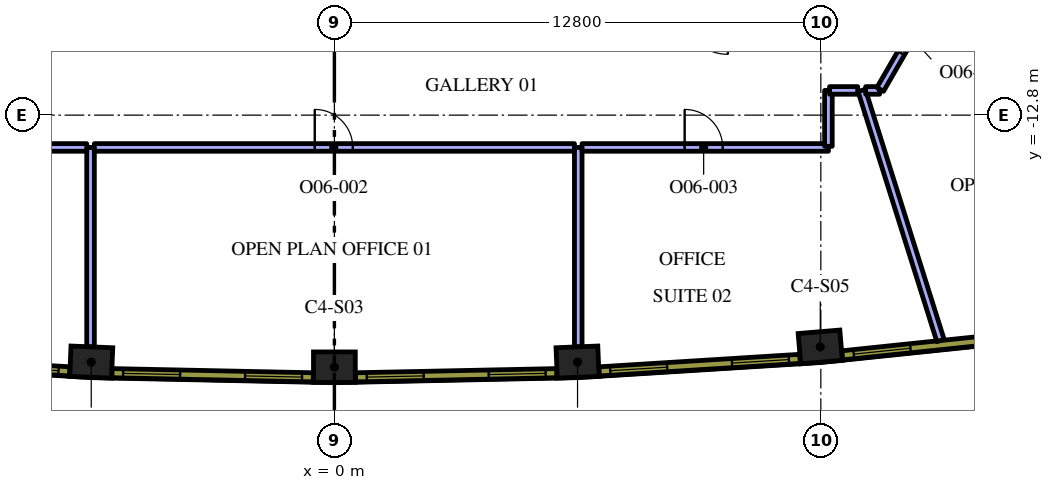
"""IFC4 building model, lengths in metres.
Left out: names, types, materials, properties, quantities, classifications, styles, units other than length and angle.
Written with IfcOpenShell. Run it as: python <this file> out.ifc"""

import sys

from ifc_helpers import new_model, si_unit, direction, frame, frame_2d, origin, origin_2d, place, context, subcontext, project, spatial, rectangle, extrude, element, fill, save


model = new_model("IFC4")
c1 = context("Model", 3, precision=1e-05, world=origin(), true_north=direction((0.0, 1.0)))
c2 = subcontext(c1, "Body", "Model", "MODEL_VIEW")
j1 = project(units=[si_unit("LENGTHUNIT", "METRE"), si_unit("PLANEANGLEUNIT", "RADIAN")], contexts=[c1])
p1 = place(None, origin())
s1 = spatial("IfcSite", under=j1, at=p1, CompositionType="ELEMENT")
p2 = place(p1, origin())
s2 = spatial("IfcBuilding", under=s1, at=p2, CompositionType="ELEMENT")
p3 = place(p2, frame((0.0, 0.0, 205.8)))
s3 = spatial("IfcBuildingStorey", under=s2, at=p3, CompositionType="ELEMENT", Elevation=205.8)
for number, where, z_axis, x_axis in (
    (1, (-6.398, -19.298, 0.0), (0.0, 0.0, 1.0), (0.999, -0.041, 0.0)),
    (2, (0.0, -19.431, 0.0), (0.0, 0.0, 1.0), (1.0, 0.0, 0.0)),
    (3, (6.398, -19.298, 0.0), (0.0, 0.0, 1.0), (0.999, 0.041, 0.0)),
    (4, (12.785, -18.9, 0.0), (0.0, 0.0, 1.0), (0.997, 0.083, 0.0)),
):
    element("IfcColumn", number, at=place(p3, frame(where, z_axis=z_axis, x_axis=x_axis)), inside=s3, PredefinedType="COLUMN", context=c2, shape_type="SweptSolid", body=[
        extrude(rectangle(XDim=1.1, YDim=0.8, at=origin_2d()), origin(), (0.0, 0.0, 1.0), 4.2),
    ])
p4 = place(p3, frame((-6.417, -13.65, 0.0), z_axis=(0.0, 0.0, 1.0), x_axis=(0.0, -1.0, 0.0)))
e5 = element("IfcWall", 5, at=p4, inside=s3, PredefinedType="PARTITIONING", context=c2, shape_type="SweptSolid", body=[
    extrude(rectangle(XDim=5.247, YDim=0.2, at=frame_2d((2.624, 0.0))), origin(), (0.0, 0.0, 1.0), 3.45),
])
p5 = place(p3, frame((-12.97, -13.65, 0.0), z_axis=(0.0, 0.0, 1.0), x_axis=(1.0, 0.0, 0.0)))
e6 = element("IfcWall", 6, at=p5, inside=s3, PredefinedType="PARTITIONING", context=c2, shape_type="SweptSolid", body=[
    extrude(rectangle(XDim=6.453, YDim=0.2, at=frame_2d((3.227, 0.0))), origin(), (0.0, 0.0, 1.0), 3.45),
])
p6 = place(p5, frame((2.7, 0.0, 0.0)))
e7 = element("IfcOpeningElement", 7, at=p6, cuts=e6, PredefinedType="OPENING", context=c2, shape_type="SweptSolid", body=[
    extrude(rectangle(XDim=1.0, YDim=2.1, at=frame_2d((0.5, 1.05))), frame((0.0, 0.11, 0.0), z_axis=(0.0, -1.0, 0.0), x_axis=(1.0, 0.0, 0.0)), (0.0, 0.0, 1.0), 0.22),
])
p7 = place(p3, frame((6.417, -13.65, 0.0), z_axis=(0.0, 0.0, 1.0), x_axis=(0.0, -1.0, 0.0)))
e8 = element("IfcWall", 8, at=p7, inside=s3, PredefinedType="PARTITIONING", context=c2, shape_type="SweptSolid", body=[
    extrude(rectangle(XDim=5.247, YDim=0.2, at=frame_2d((2.624, 0.0))), origin(), (0.0, 0.0, 1.0), 3.45),
])
p8 = place(p3, frame((-6.317, -13.65, 0.0), z_axis=(0.0, 0.0, 1.0), x_axis=(1.0, 0.0, 0.0)))
e9 = element("IfcWall", 9, at=p8, inside=s3, PredefinedType="PARTITIONING", context=c2, shape_type="SweptSolid", body=[
    extrude(rectangle(XDim=12.634, YDim=0.2, at=frame_2d((6.317, 0.0))), origin(), (0.0, 0.0, 1.0), 3.45),
])
p9 = place(p8, frame((5.8, 0.0, 0.0)))
e10 = element("IfcOpeningElement", 10, at=p9, cuts=e9, PredefinedType="OPENING", context=c2, shape_type="SweptSolid", body=[
    extrude(rectangle(XDim=1.0, YDim=2.1, at=frame_2d((0.5, 1.05))), frame((0.0, 0.11, 0.0), z_axis=(0.0, -1.0, 0.0), x_axis=(1.0, 0.0, 0.0)), (0.0, 0.0, 1.0), 0.22),
])
p10 = place(p3, frame((13.875, -12.15, 0.0), z_axis=(0.0, 0.0, 1.0), x_axis=(0.3005606746, -0.953762696316, 0.0)))
e11 = element("IfcWall", 11, at=p10, inside=s3, PredefinedType="PARTITIONING", context=c2, shape_type="SweptSolid", body=[
    extrude(rectangle(XDim=6.9, YDim=0.2, at=frame_2d((3.45, 0.0))), origin(), (0.0, 0.0, 1.0), 3.45),
])
p11 = place(p3, frame((6.517, -13.65, 0.0), z_axis=(0.0, 0.0, 1.0), x_axis=(1.0, 0.0, 0.0)))
e12 = element("IfcWall", 12, at=p11, inside=s3, PredefinedType="PARTITIONING", context=c2, shape_type="SweptSolid", body=[
    extrude(rectangle(XDim=6.483, YDim=0.2, at=frame_2d((3.242, 0.0))), origin(), (0.0, 0.0, 1.0), 3.45),
])
p12 = place(p11, frame((2.7, 0.0, 0.0)))
e13 = element("IfcOpeningElement", 13, at=p12, cuts=e12, PredefinedType="OPENING", context=c2, shape_type="SweptSolid", body=[
    extrude(rectangle(XDim=1.0, YDim=2.1, at=frame_2d((0.5, 1.05))), frame((0.0, 0.11, 0.0), z_axis=(0.0, -1.0, 0.0), x_axis=(1.0, 0.0, 0.0)), (0.0, 0.0, 1.0), 0.22),
])
p13 = place(p3, frame((13.0, -13.62, 0.0), z_axis=(0.0, 0.0, 1.0), x_axis=(0.0, 1.0, 0.0)))
e14 = element("IfcWall", 14, at=p13, inside=s3, PredefinedType="PARTITIONING", context=c2, shape_type="SweptSolid", body=[
    extrude(rectangle(XDim=1.47, YDim=0.2, at=frame_2d((0.735, 0.0))), origin(), (0.0, 0.0, 1.0), 3.45),
])
p14 = place(p3, frame((13.03, -12.15, 0.0), z_axis=(0.0, 0.0, 1.0), x_axis=(1.0, 0.0, 0.0)))
e15 = element("IfcWall", 15, at=p14, inside=s3, PredefinedType="PARTITIONING", context=c2, shape_type="SweptSolid", body=[
    extrude(rectangle(XDim=0.74, YDim=0.2, at=frame_2d((0.37, 0.0))), origin(), (0.0, 0.0, 1.0), 3.45),
])
p15 = place(p3, frame((16.021, -9.25, 0.0), z_axis=(0.0, 0.0, 1.0), x_axis=(0.86602692059, -0.499997372806, 0.0)))
e16 = element("IfcWall", 16, at=p15, inside=s3, PredefinedType="PARTITIONING", context=c2, shape_type="SweptSolid", body=[
    extrude(rectangle(XDim=6.765, YDim=0.2, at=frame_2d((3.382, 0.0))), origin(), (0.0, 0.0, 1.0), 3.45),
])
p16 = place(p3, frame((13.98, -12.15, 0.0), z_axis=(0.0, 0.0, 1.0), x_axis=(1.0, 0.0, 0.0)))
e17 = element("IfcWall", 17, at=p16, inside=s3, PredefinedType="PARTITIONING", context=c2, shape_type="SweptSolid", body=[
    extrude(rectangle(XDim=0.367, YDim=0.2, at=frame_2d((0.184, 0.0))), origin(), (0.0, 0.0, 1.0), 3.45),
])
p17 = place(p3, frame((14.362, -12.124, 0.0), z_axis=(0.0, 0.0, 1.0), x_axis=(0.500022299258, 0.866012528919, 0.0)))
e18 = element("IfcWall", 18, at=p17, inside=s3, PredefinedType="PARTITIONING", context=c2, shape_type="SweptSolid", body=[
    extrude(rectangle(XDim=3.219, YDim=0.2, at=frame_2d((1.609, 0.0))), origin(), (0.0, 0.0, 1.0), 3.45),
])
p18 = place(p17, frame((1.1, 0.0, 0.0)))
e19 = element("IfcOpeningElement", 19, at=p18, cuts=e18, PredefinedType="OPENING", context=c2, shape_type="SweptSolid", body=[
    extrude(rectangle(XDim=1.0, YDim=2.1, at=frame_2d((0.5, 1.05))), frame((0.0, 0.11, 0.0), z_axis=(0.0, -1.0, 0.0), x_axis=(1.0, 0.0, 0.0)), (0.0, 0.0, 1.0), 0.22),
])
p19 = place(p3, frame((-12.253, -19.213, 0.0), z_axis=(0.0, 0.0, 1.0), x_axis=(0.9980633213, -0.062206162685, 0.0)))
e20 = element("IfcWall", 20, at=p19, inside=s3, PredefinedType="SOLIDWALL", context=c2, shape_type="SweptSolid", body=[
    extrude(rectangle(XDim=5.298, YDim=0.24, at=frame_2d((2.649, 0.0))), origin(), (0.0, 0.0, 1.0), 3.95),
])
p20 = place(p19, frame((0.294, 0.0, 0.9)))
e21 = element("IfcOpeningElement", 21, at=p20, cuts=e20, PredefinedType="OPENING", context=c2, shape_type="SweptSolid", body=[
    extrude(rectangle(XDim=1.5, YDim=2.55, at=frame_2d((0.75, 1.275))), frame((0.0, 0.13, 0.0), z_axis=(0.0, -1.0, 0.0), x_axis=(1.0, 0.0, 0.0)), (0.0, 0.0, 1.0), 0.26),
])
p21 = place(p19, frame((3.504, 0.0, 0.9)))
e22 = element("IfcOpeningElement", 22, at=p21, cuts=e20, PredefinedType="OPENING", context=c2, shape_type="SweptSolid", body=[
    extrude(rectangle(XDim=1.5, YDim=2.55, at=frame_2d((0.75, 1.275))), frame((0.0, 0.13, 0.0), z_axis=(0.0, -1.0, 0.0), x_axis=(1.0, 0.0, 0.0)), (0.0, 0.0, 1.0), 0.26),
])
p22 = place(p3, frame((-5.854, -19.589, 0.0), z_axis=(0.0, 0.0, 1.0), x_axis=(0.999784035184, -0.020781794712, 0.0)))
e23 = element("IfcWall", 23, at=p22, inside=s3, PredefinedType="SOLIDWALL", context=c2, shape_type="SweptSolid", body=[
    extrude(rectangle(XDim=5.298, YDim=0.24, at=frame_2d((2.649, 0.0))), origin(), (0.0, 0.0, 1.0), 3.95),
])
p23 = place(p22, frame((0.294, 0.0, 0.9)))
e24 = element("IfcOpeningElement", 24, at=p23, cuts=e23, PredefinedType="OPENING", context=c2, shape_type="SweptSolid", body=[
    extrude(rectangle(XDim=1.5, YDim=2.55, at=frame_2d((0.75, 1.275))), frame((0.0, 0.13, 0.0), z_axis=(0.0, -1.0, 0.0), x_axis=(1.0, 0.0, 0.0)), (0.0, 0.0, 1.0), 0.26),
])
p24 = place(p22, frame((3.504, 0.0, 0.9)))
e25 = element("IfcOpeningElement", 25, at=p24, cuts=e23, PredefinedType="OPENING", context=c2, shape_type="SweptSolid", body=[
    extrude(rectangle(XDim=1.5, YDim=2.55, at=frame_2d((0.75, 1.275))), frame((0.0, 0.13, 0.0), z_axis=(0.0, -1.0, 0.0), x_axis=(1.0, 0.0, 0.0)), (0.0, 0.0, 1.0), 0.26),
])
p25 = place(p3, frame((0.556, -19.699, 0.0), z_axis=(0.0, 0.0, 1.0), x_axis=(0.999784035184, 0.020781794712, 0.0)))
e26 = element("IfcWall", 26, at=p25, inside=s3, PredefinedType="SOLIDWALL", context=c2, shape_type="SweptSolid", body=[
    extrude(rectangle(XDim=5.298, YDim=0.24, at=frame_2d((2.649, 0.0))), origin(), (0.0, 0.0, 1.0), 3.95),
])
p26 = place(p25, frame((0.294, 0.0, 0.9)))
e27 = element("IfcOpeningElement", 27, at=p26, cuts=e26, PredefinedType="OPENING", context=c2, shape_type="SweptSolid", body=[
    extrude(rectangle(XDim=1.5, YDim=2.55, at=frame_2d((0.75, 1.275))), frame((0.0, 0.13, 0.0), z_axis=(0.0, -1.0, 0.0), x_axis=(1.0, 0.0, 0.0)), (0.0, 0.0, 1.0), 0.26),
])
p27 = place(p25, frame((3.504, 0.0, 0.9)))
e28 = element("IfcOpeningElement", 28, at=p27, cuts=e26, PredefinedType="OPENING", context=c2, shape_type="SweptSolid", body=[
    extrude(rectangle(XDim=1.5, YDim=2.55, at=frame_2d((0.75, 1.275))), frame((0.0, 0.13, 0.0), z_axis=(0.0, -1.0, 0.0), x_axis=(1.0, 0.0, 0.0)), (0.0, 0.0, 1.0), 0.26),
])
p28 = place(p3, frame((6.965, -19.543, 0.0), z_axis=(0.0, 0.0, 1.0), x_axis=(0.9980633213, 0.062206162685, 0.0)))
e29 = element("IfcWall", 29, at=p28, inside=s3, PredefinedType="SOLIDWALL", context=c2, shape_type="SweptSolid", body=[
    extrude(rectangle(XDim=5.298, YDim=0.24, at=frame_2d((2.649, 0.0))), origin(), (0.0, 0.0, 1.0), 3.95),
])
p29 = place(p28, frame((0.295, 0.0, 0.9)))
e30 = element("IfcOpeningElement", 30, at=p29, cuts=e29, PredefinedType="OPENING", context=c2, shape_type="SweptSolid", body=[
    extrude(rectangle(XDim=1.5, YDim=2.55, at=frame_2d((0.75, 1.275))), frame((0.0, 0.13, 0.0), z_axis=(0.0, -1.0, 0.0), x_axis=(1.0, 0.0, 0.0)), (0.0, 0.0, 1.0), 0.26),
])
p30 = place(p28, frame((3.504, 0.0, 0.9)))
e31 = element("IfcOpeningElement", 31, at=p30, cuts=e29, PredefinedType="OPENING", context=c2, shape_type="SweptSolid", body=[
    extrude(rectangle(XDim=1.5, YDim=2.55, at=frame_2d((0.75, 1.275))), frame((0.0, 0.13, 0.0), z_axis=(0.0, -1.0, 0.0), x_axis=(1.0, 0.0, 0.0)), (0.0, 0.0, 1.0), 0.26),
])
p31 = place(p3, frame((13.362, -19.121, 0.0), z_axis=(0.0, 0.0, 1.0), x_axis=(0.994621961215, 0.103571976272, 0.0)))
e32 = element("IfcWall", 32, at=p31, inside=s3, PredefinedType="SOLIDWALL", context=c2, shape_type="SweptSolid", body=[
    extrude(rectangle(XDim=5.311, YDim=0.24, at=frame_2d((2.655, 0.0))), origin(), (0.0, 0.0, 1.0), 3.95),
])
p32 = place(p31, frame((0.306, 0.0, 0.9)))
e33 = element("IfcOpeningElement", 33, at=p32, cuts=e32, PredefinedType="OPENING", context=c2, shape_type="SweptSolid", body=[
    extrude(rectangle(XDim=1.5, YDim=2.55, at=frame_2d((0.75, 1.275))), frame((0.0, 0.13, 0.0), z_axis=(0.0, -1.0, 0.0), x_axis=(1.0, 0.0, 0.0)), (0.0, 0.0, 1.0), 0.26),
])
p33 = place(p31, frame((3.539, 0.0, 0.9)))
e34 = element("IfcOpeningElement", 34, at=p33, cuts=e32, PredefinedType="OPENING", context=c2, shape_type="SweptSolid", body=[
    extrude(rectangle(XDim=1.5, YDim=2.55, at=frame_2d((0.75, 1.275))), frame((0.0, 0.13, 0.0), z_axis=(0.0, -1.0, 0.0), x_axis=(1.0, 0.0, 0.0)), (0.0, 0.0, 1.0), 0.26),
])
p34 = place(p9, origin())
e35 = element("IfcDoor", 35, at=p34, inside=s3, OperationType="SINGLE_SWING_LEFT", PredefinedType="DOOR", context=c2, shape_type="SweptSolid", body=[
    extrude(rectangle(XDim=1.0, YDim=2.1, at=frame_2d((0.5, 1.05))), frame((0.0, 0.025, 0.0), z_axis=(0.0, -1.0, 0.0), x_axis=(1.0, 0.0, 0.0)), (0.0, 0.0, 1.0), 0.05),
])
fill(e10, e35)
p35 = place(p12, origin())
e36 = element("IfcDoor", 36, at=p35, inside=s3, OperationType="SINGLE_SWING_LEFT", PredefinedType="DOOR", context=c2, shape_type="SweptSolid", body=[
    extrude(rectangle(XDim=1.0, YDim=2.1, at=frame_2d((0.5, 1.05))), frame((0.0, 0.025, 0.0), z_axis=(0.0, -1.0, 0.0), x_axis=(1.0, 0.0, 0.0)), (0.0, 0.0, 1.0), 0.05),
])
fill(e13, e36)
p36 = place(p18, origin())
e37 = element("IfcDoor", 37, at=p36, inside=s3, OperationType="SINGLE_SWING_LEFT", PredefinedType="DOOR", context=c2, shape_type="SweptSolid", body=[
    extrude(rectangle(XDim=1.0, YDim=2.1, at=frame_2d((0.5, 1.05))), frame((0.0, 0.025, 0.0), z_axis=(0.0, -1.0, 0.0), x_axis=(1.0, 0.0, 0.0)), (0.0, 0.0, 1.0), 0.05),
])
fill(e19, e37)
p37 = place(p21, origin())
e38 = element("IfcWindow", 38, at=p37, inside=s3, PartitioningType="SINGLE_PANEL", PredefinedType="WINDOW", context=c2, shape_type="SweptSolid", body=[
    extrude(rectangle(XDim=1.5, YDim=2.55, at=frame_2d((0.75, 1.275))), frame((0.0, 0.04, 0.0), z_axis=(0.0, -1.0, 0.0), x_axis=(1.0, 0.0, 0.0)), (0.0, 0.0, 1.0), 0.06),
])
fill(e22, e38)
p38 = place(p23, origin())
e39 = element("IfcWindow", 39, at=p38, inside=s3, PartitioningType="SINGLE_PANEL", PredefinedType="WINDOW", context=c2, shape_type="SweptSolid", body=[
    extrude(rectangle(XDim=1.5, YDim=2.55, at=frame_2d((0.75, 1.275))), frame((0.0, 0.04, 0.0), z_axis=(0.0, -1.0, 0.0), x_axis=(1.0, 0.0, 0.0)), (0.0, 0.0, 1.0), 0.06),
])
fill(e24, e39)
p39 = place(p24, origin())
e40 = element("IfcWindow", 40, at=p39, inside=s3, PartitioningType="SINGLE_PANEL", PredefinedType="WINDOW", context=c2, shape_type="SweptSolid", body=[
    extrude(rectangle(XDim=1.5, YDim=2.55, at=frame_2d((0.75, 1.275))), frame((0.0, 0.04, 0.0), z_axis=(0.0, -1.0, 0.0), x_axis=(1.0, 0.0, 0.0)), (0.0, 0.0, 1.0), 0.06),
])
fill(e25, e40)
p40 = place(p26, origin())
e41 = element("IfcWindow", 41, at=p40, inside=s3, PartitioningType="SINGLE_PANEL", PredefinedType="WINDOW", context=c2, shape_type="SweptSolid", body=[
    extrude(rectangle(XDim=1.5, YDim=2.55, at=frame_2d((0.75, 1.275))), frame((0.0, 0.04, 0.0), z_axis=(0.0, -1.0, 0.0), x_axis=(1.0, 0.0, 0.0)), (0.0, 0.0, 1.0), 0.06),
])
fill(e27, e41)
p41 = place(p27, origin())
e42 = element("IfcWindow", 42, at=p41, inside=s3, PartitioningType="SINGLE_PANEL", PredefinedType="WINDOW", context=c2, shape_type="SweptSolid", body=[
    extrude(rectangle(XDim=1.5, YDim=2.55, at=frame_2d((0.75, 1.275))), frame((0.0, 0.04, 0.0), z_axis=(0.0, -1.0, 0.0), x_axis=(1.0, 0.0, 0.0)), (0.0, 0.0, 1.0), 0.06),
])
fill(e28, e42)
p42 = place(p29, origin())
e43 = element("IfcWindow", 43, at=p42, inside=s3, PartitioningType="SINGLE_PANEL", PredefinedType="WINDOW", context=c2, shape_type="SweptSolid", body=[
    extrude(rectangle(XDim=1.5, YDim=2.55, at=frame_2d((0.75, 1.275))), frame((0.0, 0.04, 0.0), z_axis=(0.0, -1.0, 0.0), x_axis=(1.0, 0.0, 0.0)), (0.0, 0.0, 1.0), 0.06),
])
fill(e30, e43)
p43 = place(p30, origin())
e44 = element("IfcWindow", 44, at=p43, inside=s3, PartitioningType="SINGLE_PANEL", PredefinedType="WINDOW", context=c2, shape_type="SweptSolid", body=[
    extrude(rectangle(XDim=1.5, YDim=2.55, at=frame_2d((0.75, 1.275))), frame((0.0, 0.04, 0.0), z_axis=(0.0, -1.0, 0.0), x_axis=(1.0, 0.0, 0.0)), (0.0, 0.0, 1.0), 0.06),
])
fill(e31, e44)
p44 = place(p32, origin())
e45 = element("IfcWindow", 45, at=p44, inside=s3, PartitioningType="SINGLE_PANEL", PredefinedType="WINDOW", context=c2, shape_type="SweptSolid", body=[
    extrude(rectangle(XDim=1.5, YDim=2.55, at=frame_2d((0.75, 1.275))), frame((0.0, 0.04, 0.0), z_axis=(0.0, -1.0, 0.0), x_axis=(1.0, 0.0, 0.0)), (0.0, 0.0, 1.0), 0.06),
])
fill(e33, e45)
save(model, sys.argv[1])
